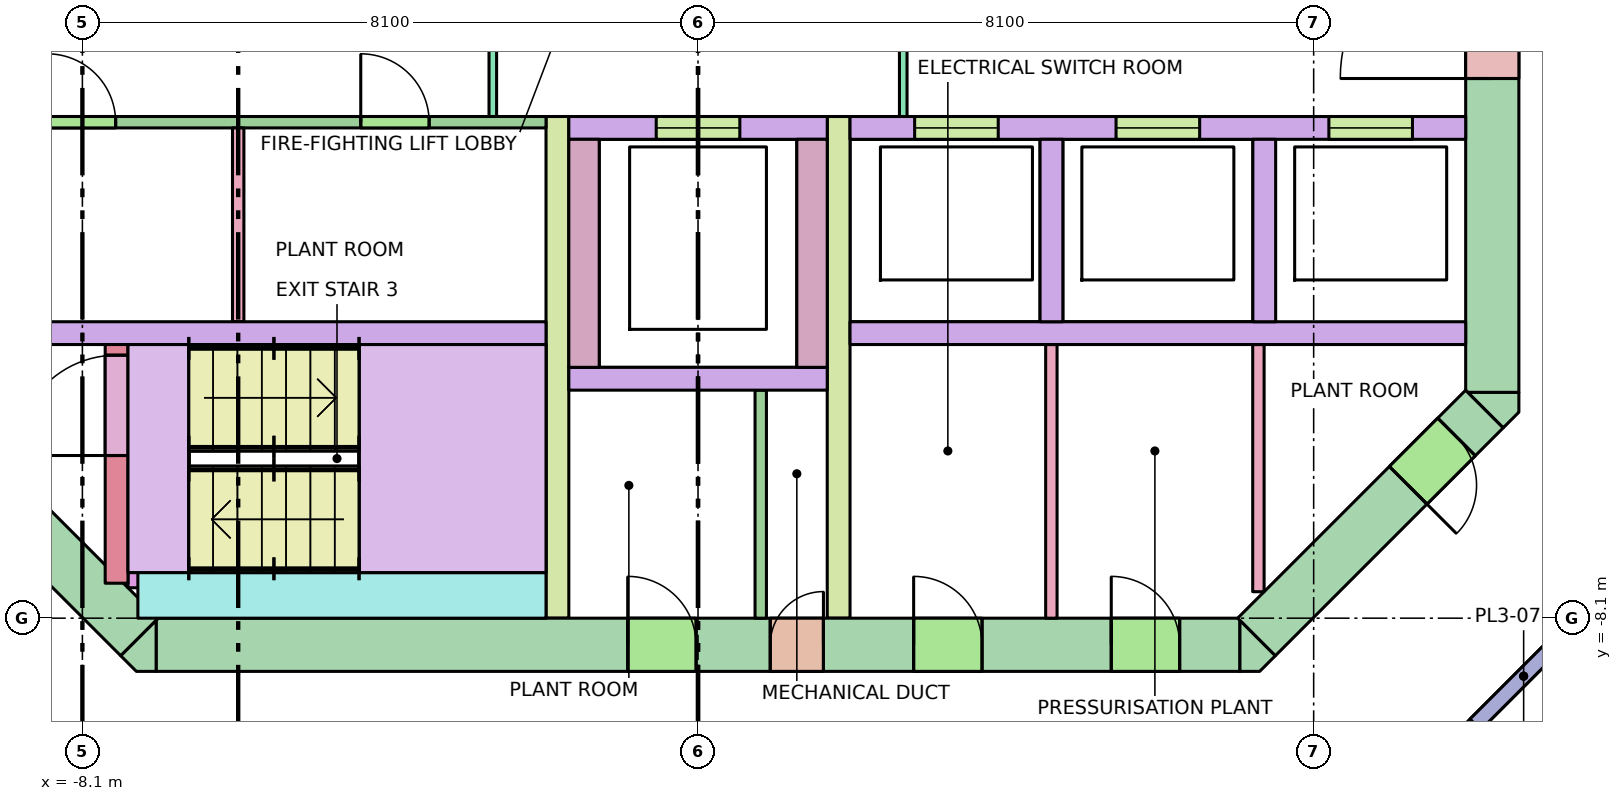
"""IFC4 building model, lengths in metres.
Left out: names, types, materials, properties, quantities, classifications, styles, units other than length and angle.
Written with IfcOpenShell. Run it as: python <this file> out.ifc"""

import sys

from ifc_helpers import new_model, si_unit, direction, frame, frame_2d, origin, place, context, subcontext, project, spatial, polyline, rectangle, outline, extrude, element, fill, save


model = new_model("IFC4")
c1 = context("Model", 3, precision=1e-05, world=origin(), true_north=direction((0.0, 1.0)))
c2 = subcontext(c1, "Body", "Model", "MODEL_VIEW")
j1 = project(units=[si_unit("LENGTHUNIT", "METRE"), si_unit("PLANEANGLEUNIT", "RADIAN")], contexts=[c1])
p1 = place(None, origin())
s1 = spatial("IfcSite", under=j1, at=p1, CompositionType="ELEMENT")
p2 = place(p1, origin())
s2 = spatial("IfcBuilding", under=s1, at=p2, CompositionType="ELEMENT")
p3 = place(p2, frame((0.0, 0.0, 248.3)))
s3 = spatial("IfcBuildingStorey", under=s2, at=p3, CompositionType="ELEMENT", Elevation=248.3)
p4 = place(p3, frame((-7.13, -8.45, -0.28), z_axis=(0.0, 0.0, 1.0), x_axis=(1.0, 0.0, 0.0)))
e1 = element("IfcWall", 1, at=p4, inside=s3, PredefinedType="SHEAR", context=c2, shape_type="SweptSolid", body=[
    extrude(rectangle(XDim=14.26, YDim=0.7, at=frame_2d((7.13, 0.0))), origin(), (0.0, 0.0, 1.0), 5.5),
])
p5 = place(p4, frame((8.08, 0.0, 0.28)))
e2 = element("IfcOpeningElement", 2, at=p5, cuts=e1, PredefinedType="OPENING", context=c2, shape_type="SweptSolid", body=[
    extrude(rectangle(XDim=0.7, YDim=2.1, at=frame_2d((0.35, 1.05))), frame((0.0, 0.36, 0.0), z_axis=(0.0, -1.0, 0.0), x_axis=(1.0, 0.0, 0.0)), (0.0, 0.0, 1.0), 0.72),
])
p6 = place(p4, frame((6.205, 0.0, 0.28)))
e3 = element("IfcOpeningElement", 3, at=p6, cuts=e1, PredefinedType="OPENING", context=c2, shape_type="SweptSolid", body=[
    extrude(rectangle(XDim=0.9, YDim=2.1, at=frame_2d((0.45, 1.05))), frame((0.0, 0.36, 0.0), z_axis=(0.0, -1.0, 0.0), x_axis=(1.0, 0.0, 0.0)), (0.0, 0.0, 1.0), 0.72),
])
p7 = place(p4, frame((9.967, 0.0, 0.28)))
e4 = element("IfcOpeningElement", 4, at=p7, cuts=e1, PredefinedType="OPENING", context=c2, shape_type="SweptSolid", body=[
    extrude(rectangle(XDim=0.9, YDim=2.1, at=frame_2d((0.45, 1.05))), frame((0.0, 0.36, 0.0), z_axis=(0.0, -1.0, 0.0), x_axis=(1.0, 0.0, 0.0)), (0.0, 0.0, 1.0), 0.72),
])
p8 = place(p4, frame((12.567, 0.0, 0.28)))
e5 = element("IfcOpeningElement", 5, at=p8, cuts=e1, PredefinedType="OPENING", context=c2, shape_type="SweptSolid", body=[
    extrude(rectangle(XDim=0.9, YDim=2.1, at=frame_2d((0.45, 1.05))), frame((0.0, 0.36, 0.0), z_axis=(0.0, -1.0, 0.0), x_axis=(1.0, 0.0, 0.0)), (0.0, 0.0, 1.0), 0.72),
])
p9 = place(p3, frame((10.45, -5.13, -0.28), z_axis=(0.0, 0.0, 1.0), x_axis=(0.0, 1.0, 0.0)))
e6 = element("IfcWall", 6, at=p9, inside=s3, PredefinedType="SHEAR", context=c2, shape_type="SweptSolid", body=[
    extrude(rectangle(XDim=10.26, YDim=0.7, at=frame_2d((5.13, 0.0))), origin(), (0.0, 0.0, 1.0), 5.5),
])
p10 = place(p9, frame((4.13, 0.0, 0.28)))
e7 = element("IfcOpeningElement", 7, at=p10, cuts=e6, PredefinedType="OPENING", context=c2, shape_type="SweptSolid", body=[
    extrude(rectangle(XDim=2.0, YDim=2.1, at=frame_2d((1.0, 1.05))), frame((0.0, 0.36, 0.0), z_axis=(0.0, -1.0, 0.0), x_axis=(1.0, 0.0, 0.0)), (0.0, 0.0, 1.0), 0.72),
])
p11 = place(p3, frame((10.347, -5.347, -0.28), z_axis=(0.0, 0.0, 1.0), x_axis=(-0.707106781187, -0.707106781187, 0.0)))
e8 = element("IfcWall", 8, at=p11, inside=s3, PredefinedType="SHEAR", context=c2, shape_type="SweptSolid", body=[
    extrude(rectangle(XDim=4.243, YDim=0.7, at=frame_2d((2.121, 0.0))), origin(), (0.0, 0.0, 1.0), 5.5),
])
p12 = place(p11, frame((0.52, 0.0, 0.28)))
e9 = element("IfcOpeningElement", 9, at=p12, cuts=e8, PredefinedType="OPENING", context=c2, shape_type="SweptSolid", body=[
    extrude(rectangle(XDim=0.9, YDim=2.1, at=frame_2d((0.45, 1.05))), frame((0.0, 0.36, 0.0), z_axis=(0.0, -1.0, 0.0), x_axis=(1.0, 0.0, 0.0)), (0.0, 0.0, 1.0), 0.72),
])
p13 = place(p3, frame((-7.347, -8.347, -0.28), z_axis=(0.0, 0.0, 1.0), x_axis=(-0.707106781187, 0.707106781187, 0.0)))
e10 = element("IfcWall", 10, at=p13, inside=s3, PredefinedType="SHEAR", context=c2, shape_type="SweptSolid", body=[
    extrude(rectangle(XDim=4.243, YDim=0.7, at=frame_2d((2.121, 0.0))), origin(), (0.0, 0.0, 1.0), 5.5),
])
p14 = place(p13, frame((2.393, 0.0, 0.28)))
e11 = element("IfcOpeningElement", 11, at=p14, cuts=e10, PredefinedType="OPENING", context=c2, shape_type="SweptSolid", body=[
    extrude(rectangle(XDim=1.2, YDim=2.1, at=frame_2d((0.6, 1.05))), frame((0.0, 0.36, 0.0), z_axis=(0.0, -1.0, 0.0), x_axis=(1.0, 0.0, 0.0)), (0.0, 0.0, 1.0), 0.72),
])
p15 = place(p3, frame((0.0, 0.0, -0.28)))
e12 = element("IfcWall", 12, at=p15, inside=s3, PredefinedType="SHEAR", context=c2, shape_type="SweptSolid", body=[
    extrude(outline(polyline([(-7.39, -8.8), (-7.595, -8.595), (-7.595, -8.595), (-7.595, -8.595), (-7.13, -8.13), (-7.13, -8.8), (-7.13, -8.8), (-7.39, -8.8)])), origin(), (0.0, 0.0, 1.0), 5.5),
])
p16 = place(p3, frame((0.0, 0.0, -0.28)))
e13 = element("IfcWall", 13, at=p16, inside=s3, PredefinedType="SHEAR", context=c2, shape_type="SweptSolid", body=[
    extrude(outline(polyline([(7.39, -8.8), (7.13, -8.8), (7.13, -8.8), (7.13, -8.13), (7.595, -8.595), (7.595, -8.595), (7.595, -8.595), (7.39, -8.8)])), origin(), (0.0, 0.0, 1.0), 5.5),
])
p17 = place(p3, frame((0.0, 0.0, -0.28)))
e14 = element("IfcWall", 14, at=p17, inside=s3, PredefinedType="SHEAR", context=c2, shape_type="SweptSolid", body=[
    extrude(outline(polyline([(10.8, -5.39), (10.595, -5.595), (10.595, -5.595), (10.595, -5.595), (10.13, -5.13), (10.8, -5.13), (10.8, -5.13), (10.8, -5.39)])), origin(), (0.0, 0.0, 1.0), 5.5),
])
for number, where, z_axis, x_axis in (
    (15, (-10.1, -4.35, 0.0), (0.0, 0.0, 1.0), (1.0, 0.0, 0.0)),
    (16, (2.0, -4.35, 0.0), (0.0, 0.0, 1.0), (1.0, 0.0, 0.0)),
):
    element("IfcWall", number, at=place(p3, frame(where, z_axis=z_axis, x_axis=x_axis)), inside=s3, PredefinedType="SOLIDWALL", context=c2, shape_type="SweptSolid", body=[
        extrude(rectangle(XDim=8.1, YDim=0.3, at=frame_2d((4.05, 0.0))), origin(), (0.0, 0.0, 1.0), 5.22),
    ])
p18 = place(p3, frame((2.0, -1.65, 0.0), z_axis=(0.0, 0.0, 1.0), x_axis=(1.0, 0.0, 0.0)))
e17 = element("IfcWall", 17, at=p18, inside=s3, PredefinedType="SOLIDWALL", context=c2, shape_type="SweptSolid", body=[
    extrude(rectangle(XDim=8.1, YDim=0.3, at=frame_2d((4.05, 0.0))), origin(), (0.0, 0.0, 1.0), 5.22),
])
p19 = place(p18, frame((0.85, 0.0, 0.0)))
e18 = element("IfcOpeningElement", 18, at=p19, cuts=e17, PredefinedType="OPENING", context=c2, shape_type="SweptSolid", body=[
    extrude(rectangle(XDim=1.1, YDim=2.1, at=frame_2d((0.55, 1.05))), frame((0.0, 0.16, 0.0), z_axis=(0.0, -1.0, 0.0), x_axis=(1.0, 0.0, 0.0)), (0.0, 0.0, 1.0), 0.32),
])
p20 = place(p18, frame((3.5, 0.0, 0.0)))
e19 = element("IfcOpeningElement", 19, at=p20, cuts=e17, PredefinedType="OPENING", context=c2, shape_type="SweptSolid", body=[
    extrude(rectangle(XDim=1.1, YDim=2.1, at=frame_2d((0.55, 1.05))), frame((0.0, 0.16, 0.0), z_axis=(0.0, -1.0, 0.0), x_axis=(1.0, 0.0, 0.0)), (0.0, 0.0, 1.0), 0.32),
])
p21 = place(p18, frame((6.3, 0.0, 0.0)))
e20 = element("IfcOpeningElement", 20, at=p21, cuts=e17, PredefinedType="OPENING", context=c2, shape_type="SweptSolid", body=[
    extrude(rectangle(XDim=1.1, YDim=2.1, at=frame_2d((0.55, 1.05))), frame((0.0, 0.16, 0.0), z_axis=(0.0, -1.0, 0.0), x_axis=(1.0, 0.0, 0.0)), (0.0, 0.0, 1.0), 0.32),
])
for number, where, z_axis, x_axis in (
    (21, (4.65, -4.2, 0.0), (0.0, 0.0, 1.0), (0.0, 1.0, 0.0)),
    (22, (7.45, -4.2, 0.0), (0.0, 0.0, 1.0), (0.0, 1.0, 0.0)),
):
    element("IfcWall", number, at=place(p3, frame(where, z_axis=z_axis, x_axis=x_axis)), inside=s3, PredefinedType="SOLIDWALL", context=c2, shape_type="SweptSolid", body=[
        extrude(rectangle(XDim=2.4, YDim=0.3, at=frame_2d((1.2, 0.0))), origin(), (0.0, 0.0, 1.0), 5.22),
    ])
for number, where, z_axis, x_axis in (
    (23, (-1.85, -8.1, 0.0), (0.0, 0.0, 1.0), (0.0, 1.0, 0.0)),
    (24, (1.85, -8.1, 0.0), (0.0, 0.0, 1.0), (0.0, 1.0, 0.0)),
):
    element("IfcWall", number, at=place(p3, frame(where, z_axis=z_axis, x_axis=x_axis)), inside=s3, PredefinedType="SHEAR", context=c2, shape_type="SweptSolid", body=[
        extrude(rectangle(XDim=6.6, YDim=0.3, at=frame_2d((3.3, 0.0))), origin(), (0.0, 0.0, 1.0), 5.22),
    ])
p22 = place(p3, frame((-1.7, -1.65, 0.0), z_axis=(0.0, 0.0, 1.0), x_axis=(1.0, 0.0, 0.0)))
e25 = element("IfcWall", 25, at=p22, inside=s3, PredefinedType="SOLIDWALL", context=c2, shape_type="SweptSolid", body=[
    extrude(rectangle(XDim=3.4, YDim=0.3, at=frame_2d((1.7, 0.0))), origin(), (0.0, 0.0, 1.0), 5.22),
])
p23 = place(p22, frame((1.15, 0.0, 0.0)))
e26 = element("IfcOpeningElement", 26, at=p23, cuts=e25, PredefinedType="OPENING", context=c2, shape_type="SweptSolid", body=[
    extrude(rectangle(XDim=1.1, YDim=2.1, at=frame_2d((0.55, 1.05))), frame((0.0, 0.16, 0.0), z_axis=(0.0, -1.0, 0.0), x_axis=(1.0, 0.0, 0.0)), (0.0, 0.0, 1.0), 0.32),
])
for number, where, z_axis, x_axis in (
    (27, (-1.5, -4.8, 0.0), (0.0, 0.0, 1.0), (0.0, 1.0, 0.0)),
    (28, (1.5, -4.8, 0.0), (0.0, 0.0, 1.0), (0.0, 1.0, 0.0)),
):
    element("IfcWall", number, at=place(p3, frame(where, z_axis=z_axis, x_axis=x_axis)), inside=s3, PredefinedType="SOLIDWALL", context=c2, shape_type="SweptSolid", body=[
        extrude(rectangle(XDim=3.0, YDim=0.4, at=frame_2d((1.5, 0.0))), origin(), (0.0, 0.0, 1.0), 5.22),
    ])
p24 = place(p3, frame((-1.7, -4.95, 0.0), z_axis=(0.0, 0.0, 1.0), x_axis=(1.0, 0.0, 0.0)))
e29 = element("IfcWall", 29, at=p24, inside=s3, PredefinedType="SOLIDWALL", context=c2, shape_type="SweptSolid", body=[
    extrude(rectangle(XDim=3.4, YDim=0.3, at=frame_2d((1.7, 0.0))), origin(), (0.0, 0.0, 1.0), 5.22),
])
p25 = place(p3, frame((-7.65, -7.64, 0.0), z_axis=(0.0, 0.0, 1.0), x_axis=(0.0, 1.0, 0.0)))
e30 = element("IfcWall", 30, at=p25, inside=s3, PredefinedType="SHEAR", context=c2, shape_type="SweptSolid", body=[
    extrude(rectangle(XDim=3.14, YDim=0.3, at=frame_2d((1.57, 0.0))), origin(), (0.0, 0.0, 1.0), 5.22),
])
p26 = place(p25, frame((1.68, 0.0, 0.0)))
e31 = element("IfcOpeningElement", 31, at=p26, cuts=e30, PredefinedType="OPENING", context=c2, shape_type="SweptSolid", body=[
    extrude(rectangle(XDim=1.32, YDim=2.1, at=frame_2d((0.66, 1.05))), frame((0.0, 0.16, 0.0), z_axis=(0.0, -1.0, 0.0), x_axis=(1.0, 0.0, 0.0)), (0.0, 0.0, 1.0), 0.32),
])
p27 = place(p3, frame((-7.5, -7.6, 0.0), z_axis=(0.0, 0.0, 1.0), x_axis=(1.0, 0.0, 0.0)))
e32 = element("IfcWall", 32, at=p27, inside=s3, PredefinedType="SHEAR", context=c2, shape_type="SweptSolid", body=[
    extrude(rectangle(XDim=0.6, YDim=0.2, at=frame_2d((0.3, 0.0))), origin(), (0.0, 0.0, 1.0), 5.22),
])
p28 = place(p3, frame((-7.37, -7.8, 0.0), z_axis=(0.0, 0.0, 1.0), x_axis=(1.0, 0.0, 0.0)))
e33 = element("IfcWall", 33, at=p28, inside=s3, PredefinedType="SHEAR", context=c2, shape_type="SweptSolid", body=[
    extrude(rectangle(XDim=5.37, YDim=0.6, at=frame_2d((2.685, 0.0))), origin(), (0.0, 0.0, 1.0), 5.22),
])
p29 = place(p3, frame((-2.7, -1.5, 0.0), z_axis=(0.0, 0.0, 1.0), x_axis=(0.0, 1.0, 0.0)))
e34 = element("IfcWall", 34, at=p29, inside=s3, PredefinedType="PARTITIONING", context=c2, shape_type="SweptSolid", body=[
    extrude(rectangle(XDim=3.0, YDim=0.1, at=frame_2d((1.5, 0.0))), origin(), (0.0, 0.0, 1.0), 5.22),
])
p30 = place(p29, frame((0.9, 0.0, 0.0)))
e35 = element("IfcOpeningElement", 35, at=p30, cuts=e34, PredefinedType="OPENING", context=c2, shape_type="SweptSolid", body=[
    extrude(rectangle(XDim=1.2, YDim=2.1, at=frame_2d((0.6, 1.05))), frame((0.0, 0.06, 0.0), z_axis=(0.0, -1.0, 0.0), x_axis=(1.0, 0.0, 0.0)), (0.0, 0.0, 1.0), 0.12),
])
p31 = place(p3, frame((2.7, -1.5, 0.0), z_axis=(0.0, 0.0, 1.0), x_axis=(0.0, 1.0, 0.0)))
e36 = element("IfcWall", 36, at=p31, inside=s3, PredefinedType="PARTITIONING", context=c2, shape_type="SweptSolid", body=[
    extrude(rectangle(XDim=3.0, YDim=0.1, at=frame_2d((1.5, 0.0))), origin(), (0.0, 0.0, 1.0), 5.22),
])
p32 = place(p31, frame((0.9, 0.0, 0.0)))
e37 = element("IfcOpeningElement", 37, at=p32, cuts=e36, PredefinedType="OPENING", context=c2, shape_type="SweptSolid", body=[
    extrude(rectangle(XDim=1.2, YDim=2.1, at=frame_2d((0.6, 1.05))), frame((0.0, 0.06, 0.0), z_axis=(0.0, -1.0, 0.0), x_axis=(1.0, 0.0, 0.0)), (0.0, 0.0, 1.0), 0.12),
])
p33 = place(p3, frame((0.825, -8.1, 0.0), z_axis=(0.0, 0.0, 1.0), x_axis=(0.0, 1.0, 0.0)))
e38 = element("IfcWall", 38, at=p33, inside=s3, PredefinedType="PARTITIONING", context=c2, shape_type="SweptSolid", body=[
    extrude(rectangle(XDim=3.0, YDim=0.15, at=frame_2d((1.5, 0.0))), origin(), (0.0, 0.0, 1.0), 5.22),
])
p34 = place(p3, frame((4.649, -8.1, 0.0), z_axis=(0.0, 0.0, 1.0), x_axis=(0.0, 1.0, 0.0)))
e39 = element("IfcWall", 39, at=p34, inside=s3, PredefinedType="PARTITIONING", context=c2, shape_type="SweptSolid", body=[
    extrude(rectangle(XDim=3.6, YDim=0.15, at=frame_2d((1.8, 0.0))), origin(), (0.0, 0.0, 1.0), 5.22),
])
p35 = place(p3, frame((7.373, -7.752, 0.0), z_axis=(0.0, 0.0, 1.0), x_axis=(0.0, 1.0, 0.0)))
e40 = element("IfcWall", 40, at=p35, inside=s3, PredefinedType="PARTITIONING", context=c2, shape_type="SweptSolid", body=[
    extrude(rectangle(XDim=3.252, YDim=0.15, at=frame_2d((1.626, 0.0))), origin(), (0.0, 0.0, 1.0), 5.22),
])
p36 = place(p3, frame((-6.05, -4.2, 0.0), z_axis=(0.0, 0.0, 1.0), x_axis=(0.0, 1.0, 0.0)))
e41 = element("IfcWall", 41, at=p36, inside=s3, PredefinedType="PARTITIONING", context=c2, shape_type="SweptSolid", body=[
    extrude(rectangle(XDim=2.55, YDim=0.15, at=frame_2d((1.275, 0.0))), origin(), (0.0, 0.0, 1.0), 5.22),
])
p37 = place(p3, frame((-10.1, -1.575, 0.0), z_axis=(0.0, 0.0, 1.0), x_axis=(1.0, 0.0, 0.0)))
e42 = element("IfcWall", 42, at=p37, inside=s3, PredefinedType="PARTITIONING", context=c2, shape_type="SweptSolid", body=[
    extrude(rectangle(XDim=8.1, YDim=0.15, at=frame_2d((4.05, 0.0))), origin(), (0.0, 0.0, 1.0), 5.22),
])
p38 = place(p37, frame((1.538, 0.0, 0.0)))
e43 = element("IfcOpeningElement", 43, at=p38, cuts=e42, PredefinedType="OPENING", context=c2, shape_type="SweptSolid", body=[
    extrude(rectangle(XDim=0.9, YDim=2.1, at=frame_2d((0.45, 1.05))), frame((0.0, 0.085, 0.0), z_axis=(0.0, -1.0, 0.0), x_axis=(1.0, 0.0, 0.0)), (0.0, 0.0, 1.0), 0.17),
])
p39 = place(p37, frame((5.663, 0.0, 0.0)))
e44 = element("IfcOpeningElement", 44, at=p39, cuts=e42, PredefinedType="OPENING", context=c2, shape_type="SweptSolid", body=[
    extrude(rectangle(XDim=0.9, YDim=2.1, at=frame_2d((0.45, 1.05))), frame((0.0, 0.085, 0.0), z_axis=(0.0, -1.0, 0.0), x_axis=(1.0, 0.0, 0.0)), (0.0, 0.0, 1.0), 0.17),
])
p40 = place(p3, frame((13.25, -6.475, 0.0), z_axis=(0.0, 0.0, 1.0), x_axis=(-0.707106781187, -0.707106781187, 0.0)))
e45 = element("IfcWall", 45, at=p40, inside=s3, PredefinedType="PARTITIONING", context=c2, shape_type="SweptSolid", body=[
    extrude(rectangle(XDim=6.753, YDim=0.2, at=frame_2d((3.377, 0.0))), origin(), (0.0, 0.0, 1.0), 4.37),
])
p41 = place(p40, frame((2.477, 0.0, 0.0)))
e46 = element("IfcOpeningElement", 46, at=p41, cuts=e45, PredefinedType="OPENING", context=c2, shape_type="SweptSolid", body=[
    extrude(rectangle(XDim=1.8, YDim=2.1, at=frame_2d((0.9, 1.05))), frame((0.0, 0.11, 0.0), z_axis=(0.0, -1.0, 0.0), x_axis=(1.0, 0.0, 0.0)), (0.0, 0.0, 1.0), 0.22),
])
p42 = place(p3, frame((-8.475, -11.25, 0.0), z_axis=(0.0, 0.0, 1.0), x_axis=(-0.707106781187, 0.707106781187, 0.0)))
e47 = element("IfcWall", 47, at=p42, inside=s3, PredefinedType="PARTITIONING", context=c2, shape_type="SweptSolid", body=[
    extrude(rectangle(XDim=6.753, YDim=0.2, at=frame_2d((3.377, 0.0))), origin(), (0.0, 0.0, 1.0), 4.37),
])
p43 = place(p42, frame((1.976, 0.0, 0.0)))
e48 = element("IfcOpeningElement", 48, at=p43, cuts=e47, PredefinedType="OPENING", context=c2, shape_type="SweptSolid", body=[
    extrude(rectangle(XDim=1.8, YDim=2.1, at=frame_2d((0.9, 1.05))), frame((0.0, 0.11, 0.0), z_axis=(0.0, -1.0, 0.0), x_axis=(1.0, 0.0, 0.0)), (0.0, 0.0, 1.0), 0.22),
])
p44 = place(p19, origin())
e49 = element("IfcDoor", 49, at=p44, inside=s3, OperationType="DOUBLE_DOOR_SLIDING", PredefinedType="DOOR", context=c2, shape_type="SweptSolid", body=[
    extrude(rectangle(XDim=1.1, YDim=2.1, at=frame_2d((0.55, 1.05))), frame((0.0, 0.025, 0.0), z_axis=(0.0, -1.0, 0.0), x_axis=(1.0, 0.0, 0.0)), (0.0, 0.0, 1.0), 0.05),
])
fill(e18, e49)
p45 = place(p20, origin())
e50 = element("IfcDoor", 50, at=p45, inside=s3, OperationType="DOUBLE_DOOR_SLIDING", PredefinedType="DOOR", context=c2, shape_type="SweptSolid", body=[
    extrude(rectangle(XDim=1.1, YDim=2.1, at=frame_2d((0.55, 1.05))), frame((0.0, 0.025, 0.0), z_axis=(0.0, -1.0, 0.0), x_axis=(1.0, 0.0, 0.0)), (0.0, 0.0, 1.0), 0.05),
])
fill(e19, e50)
p46 = place(p21, origin())
e51 = element("IfcDoor", 51, at=p46, inside=s3, OperationType="DOUBLE_DOOR_SLIDING", PredefinedType="DOOR", context=c2, shape_type="SweptSolid", body=[
    extrude(rectangle(XDim=1.1, YDim=2.1, at=frame_2d((0.55, 1.05))), frame((0.0, 0.025, 0.0), z_axis=(0.0, -1.0, 0.0), x_axis=(1.0, 0.0, 0.0)), (0.0, 0.0, 1.0), 0.05),
])
fill(e20, e51)
p47 = place(p23, origin())
e52 = element("IfcDoor", 52, at=p47, inside=s3, OperationType="DOUBLE_DOOR_SLIDING", PredefinedType="DOOR", context=c2, shape_type="SweptSolid", body=[
    extrude(rectangle(XDim=1.1, YDim=2.1, at=frame_2d((0.55, 1.05))), frame((0.0, 0.025, 0.0), z_axis=(0.0, -1.0, 0.0), x_axis=(1.0, 0.0, 0.0)), (0.0, 0.0, 1.0), 0.05),
])
fill(e26, e52)
p48 = place(p26, origin())
e53 = element("IfcDoor", 53, at=p48, inside=s3, OperationType="DOUBLE_DOOR_SINGLE_SWING", PredefinedType="DOOR", context=c2, shape_type="SweptSolid", body=[
    extrude(rectangle(XDim=1.32, YDim=2.1, at=frame_2d((0.66, 1.05))), frame((0.0, 0.025, 0.0), z_axis=(0.0, -1.0, 0.0), x_axis=(1.0, 0.0, 0.0)), (0.0, 0.0, 1.0), 0.05),
])
fill(e31, e53)
p49 = place(p10, origin())
e54 = element("IfcDoor", 54, at=p49, inside=s3, OperationType="DOUBLE_DOOR_SINGLE_SWING", PredefinedType="DOOR", context=c2, shape_type="SweptSolid", body=[
    extrude(rectangle(XDim=2.0, YDim=2.1, at=frame_2d((1.0, 1.05))), frame((0.0, 0.025, 0.0), z_axis=(0.0, -1.0, 0.0), x_axis=(1.0, 0.0, 0.0)), (0.0, 0.0, 1.0), 0.05),
])
fill(e7, e54)
p50 = place(p5, origin())
e55 = element("IfcDoor", 55, at=p50, inside=s3, OperationType="SINGLE_SWING_RIGHT", PredefinedType="DOOR", context=c2, shape_type="SweptSolid", body=[
    extrude(rectangle(XDim=0.7, YDim=2.1, at=frame_2d((0.35, 1.05))), frame((0.0, 0.025, 0.0), z_axis=(0.0, -1.0, 0.0), x_axis=(1.0, 0.0, 0.0)), (0.0, 0.0, 1.0), 0.05),
])
fill(e2, e55)
p51 = place(p6, origin())
e56 = element("IfcDoor", 56, at=p51, inside=s3, OperationType="SINGLE_SWING_LEFT", PredefinedType="DOOR", context=c2, shape_type="SweptSolid", body=[
    extrude(rectangle(XDim=0.9, YDim=2.1, at=frame_2d((0.45, 1.05))), frame((0.0, 0.025, 0.0), z_axis=(0.0, -1.0, 0.0), x_axis=(1.0, 0.0, 0.0)), (0.0, 0.0, 1.0), 0.05),
])
fill(e3, e56)
p52 = place(p7, origin())
e57 = element("IfcDoor", 57, at=p52, inside=s3, OperationType="SINGLE_SWING_LEFT", PredefinedType="DOOR", context=c2, shape_type="SweptSolid", body=[
    extrude(rectangle(XDim=0.9, YDim=2.1, at=frame_2d((0.45, 1.05))), frame((0.0, 0.025, 0.0), z_axis=(0.0, -1.0, 0.0), x_axis=(1.0, 0.0, 0.0)), (0.0, 0.0, 1.0), 0.05),
])
fill(e4, e57)
p53 = place(p8, origin())
e58 = element("IfcDoor", 58, at=p53, inside=s3, OperationType="SINGLE_SWING_LEFT", PredefinedType="DOOR", context=c2, shape_type="SweptSolid", body=[
    extrude(rectangle(XDim=0.9, YDim=2.1, at=frame_2d((0.45, 1.05))), frame((0.0, 0.025, 0.0), z_axis=(0.0, -1.0, 0.0), x_axis=(1.0, 0.0, 0.0)), (0.0, 0.0, 1.0), 0.05),
])
fill(e5, e58)
p54 = place(p12, origin())
e59 = element("IfcDoor", 59, at=p54, inside=s3, OperationType="SINGLE_SWING_RIGHT", PredefinedType="DOOR", context=c2, shape_type="SweptSolid", body=[
    extrude(rectangle(XDim=0.9, YDim=2.1, at=frame_2d((0.45, 1.05))), frame((0.0, 0.025, 0.0), z_axis=(0.0, -1.0, 0.0), x_axis=(1.0, 0.0, 0.0)), (0.0, 0.0, 1.0), 0.05),
])
fill(e9, e59)
p55 = place(p38, origin())
e60 = element("IfcDoor", 60, at=p55, inside=s3, OperationType="SINGLE_SWING_LEFT", PredefinedType="DOOR", context=c2, shape_type="SweptSolid", body=[
    extrude(rectangle(XDim=0.9, YDim=2.1, at=frame_2d((0.45, 1.05))), frame((0.0, 0.025, 0.0), z_axis=(0.0, -1.0, 0.0), x_axis=(1.0, 0.0, 0.0)), (0.0, 0.0, 1.0), 0.05),
])
fill(e43, e60)
p56 = place(p39, origin())
e61 = element("IfcDoor", 61, at=p56, inside=s3, OperationType="SINGLE_SWING_LEFT", PredefinedType="DOOR", context=c2, shape_type="SweptSolid", body=[
    extrude(rectangle(XDim=0.9, YDim=2.1, at=frame_2d((0.45, 1.05))), frame((0.0, 0.025, 0.0), z_axis=(0.0, -1.0, 0.0), x_axis=(1.0, 0.0, 0.0)), (0.0, 0.0, 1.0), 0.05),
])
fill(e44, e61)
p57 = place(p41, origin())
e62 = element("IfcDoor", 62, at=p57, inside=s3, OperationType="DOUBLE_DOOR_SINGLE_SWING", PredefinedType="DOOR", context=c2, shape_type="SweptSolid", body=[
    extrude(rectangle(XDim=1.8, YDim=2.1, at=frame_2d((0.9, 1.05))), frame((0.0, 0.025, 0.0), z_axis=(0.0, -1.0, 0.0), x_axis=(1.0, 0.0, 0.0)), (0.0, 0.0, 1.0), 0.05),
])
fill(e46, e62)
save(model, sys.argv[1])
